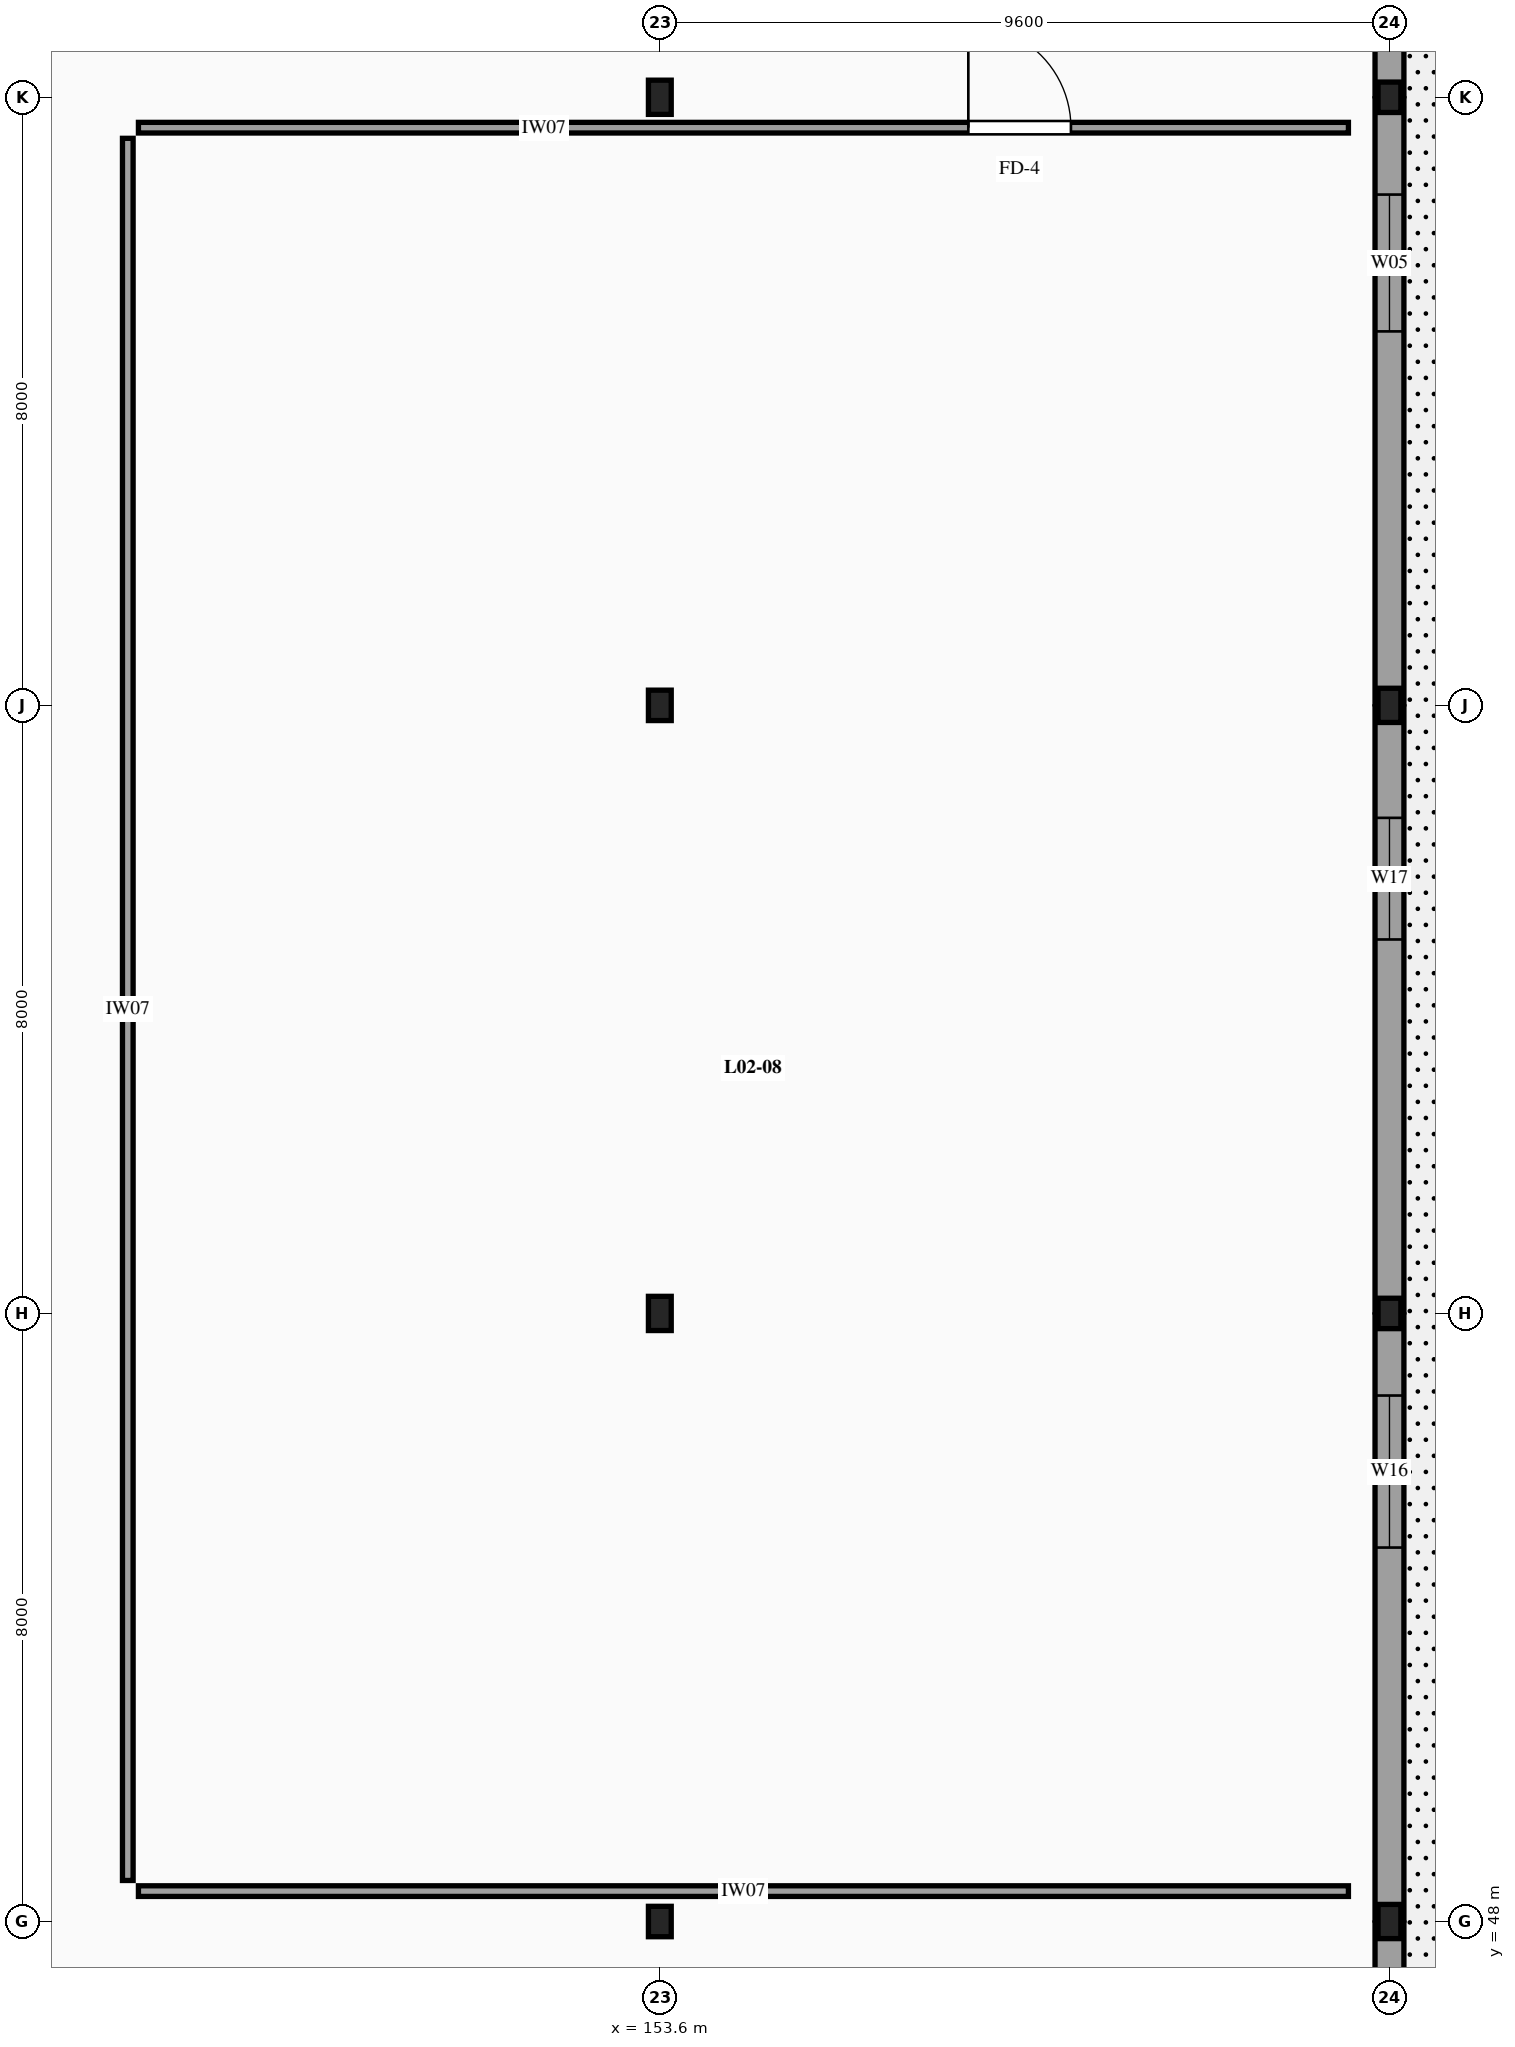
"""IFC4 building model, lengths in metres.
Left out: names, types, materials, properties, quantities, classifications, styles, units other than length and angle.
Written with IfcOpenShell. Run it as: python <this file> out.ifc"""

import sys

from ifc_helpers import new_model, si_unit, direction, frame, frame_2d, origin, origin_2d, place, context, subcontext, project, spatial, rectangle, i_section, extrude, element, fill, save


model = new_model("IFC4")
c1 = context("Model", 3, precision=1e-05, world=origin(), true_north=direction((0.0, 1.0)))
c2 = subcontext(c1, "Body", "Model", "MODEL_VIEW")
j1 = project(units=[si_unit("LENGTHUNIT", "METRE"), si_unit("PLANEANGLEUNIT", "RADIAN")], contexts=[c1])
p1 = place(None, origin())
s1 = spatial("IfcSite", under=j1, at=p1, CompositionType="ELEMENT")
p2 = place(p1, origin())
s2 = spatial("IfcBuilding", under=s1, at=p2, CompositionType="ELEMENT")
p3 = place(p2, frame((0.0, 0.0, 8.7)))
s3 = spatial("IfcBuildingStorey", under=s2, at=p3, CompositionType="ELEMENT", Elevation=8.7)
p4 = place(p3, frame((153.6, 48.0, -0.26), z_axis=(0.0, 0.0, 1.0), x_axis=(1.0, 0.0, 0.0)))
e1 = element("IfcColumn", 1, at=p4, inside=s3, PredefinedType="COLUMN", context=c2, shape_type="SweptSolid", body=[
    extrude(i_section(OverallWidth=0.3, OverallDepth=0.4, WebThickness=0.013, FlangeThickness=0.024, FilletRadius=0.027, at=origin_2d()), origin(), (0.0, 0.0, 1.0), 4.2),
])
p5 = place(p3, frame((153.6, 56.0, -0.26), z_axis=(0.0, 0.0, 1.0), x_axis=(1.0, 0.0, 0.0)))
e2 = element("IfcColumn", 2, at=p5, inside=s3, PredefinedType="COLUMN", context=c2, shape_type="SweptSolid", body=[
    extrude(i_section(OverallWidth=0.3, OverallDepth=0.45, WebThickness=0.014, FlangeThickness=0.026, FilletRadius=0.027, at=origin_2d()), origin(), (0.0, 0.0, 1.0), 4.2),
])
p6 = place(p3, frame((153.6, 64.0, -0.26), z_axis=(0.0, 0.0, 1.0), x_axis=(1.0, 0.0, 0.0)))
e3 = element("IfcColumn", 3, at=p6, inside=s3, PredefinedType="COLUMN", context=c2, shape_type="SweptSolid", body=[
    extrude(i_section(OverallWidth=0.3, OverallDepth=0.4, WebThickness=0.013, FlangeThickness=0.024, FilletRadius=0.027, at=origin_2d()), origin(), (0.0, 0.0, 1.0), 4.2),
])
for number, where, z_axis, x_axis in (
    (4, (153.6, 72.0, -0.26), (0.0, 0.0, 1.0), (1.0, 0.0, 0.0)),
    (5, (163.2, 48.0, -0.26), (0.0, 0.0, 1.0), (1.0, 0.0, 0.0)),
):
    element("IfcColumn", number, at=place(p3, frame(where, z_axis=z_axis, x_axis=x_axis)), inside=s3, PredefinedType="COLUMN", context=c2, shape_type="SweptSolid", body=[
        extrude(i_section(OverallWidth=0.3, OverallDepth=0.45, WebThickness=0.014, FlangeThickness=0.026, FilletRadius=0.027, at=origin_2d()), origin(), (0.0, 0.0, 1.0), 4.2),
    ])
p7 = place(p3, frame((163.2, 56.0, -0.26), z_axis=(0.0, 0.0, 1.0), x_axis=(1.0, 0.0, 0.0)))
e6 = element("IfcColumn", 6, at=p7, inside=s3, PredefinedType="COLUMN", context=c2, shape_type="SweptSolid", body=[
    extrude(i_section(OverallWidth=0.3, OverallDepth=0.4, WebThickness=0.013, FlangeThickness=0.024, FilletRadius=0.027, at=origin_2d()), origin(), (0.0, 0.0, 1.0), 4.2),
])
p8 = place(p3, frame((163.2, 64.0, -0.26), z_axis=(0.0, 0.0, 1.0), x_axis=(1.0, 0.0, 0.0)))
e7 = element("IfcColumn", 7, at=p8, inside=s3, PredefinedType="COLUMN", context=c2, shape_type="SweptSolid", body=[
    extrude(i_section(OverallWidth=0.3, OverallDepth=0.45, WebThickness=0.014, FlangeThickness=0.026, FilletRadius=0.027, at=origin_2d()), origin(), (0.0, 0.0, 1.0), 4.2),
])
p9 = place(p3, frame((163.2, 72.0, -0.26), z_axis=(0.0, 0.0, 1.0), x_axis=(1.0, 0.0, 0.0)))
e8 = element("IfcColumn", 8, at=p9, inside=s3, PredefinedType="COLUMN", context=c2, shape_type="SweptSolid", body=[
    extrude(i_section(OverallWidth=0.3, OverallDepth=0.4, WebThickness=0.013, FlangeThickness=0.024, FilletRadius=0.027, at=origin_2d()), origin(), (0.0, 0.0, 1.0), 4.2),
])
p10 = place(p3, frame((163.2, 40.02, 0.0), z_axis=(0.0, 0.0, 1.0), x_axis=(0.0, 1.0, 0.0)))
e9 = element("IfcWall", 9, at=p10, inside=s3, PredefinedType="SOLIDWALL", context=c2, shape_type="SweptSolid", body=[
    extrude(rectangle(XDim=7.96, YDim=0.38, at=frame_2d((3.98, 0.0))), origin(), (0.0, 0.0, 1.0), 3.36),
])
p11 = place(p10, frame((4.9, 0.0, 0.72)))
e10 = element("IfcOpeningElement", 10, at=p11, cuts=e9, PredefinedType="OPENING", context=c2, shape_type="SweptSolid", body=[
    extrude(rectangle(XDim=1.8, YDim=1.6, at=frame_2d((0.9, 0.8))), frame((0.0, 0.2, 0.0), z_axis=(0.0, -1.0, 0.0), x_axis=(1.0, 0.0, 0.0)), (0.0, 0.0, 1.0), 0.4),
])
p12 = place(p3, frame((163.2, 48.02, 0.0), z_axis=(0.0, 0.0, 1.0), x_axis=(0.0, 1.0, 0.0)))
e11 = element("IfcWall", 11, at=p12, inside=s3, PredefinedType="SOLIDWALL", context=c2, shape_type="SweptSolid", body=[
    extrude(rectangle(XDim=7.96, YDim=0.38, at=frame_2d((3.98, 0.0))), origin(), (0.0, 0.0, 1.0), 3.36),
])
p13 = place(p12, frame((4.9, 0.0, 0.9)))
e12 = element("IfcOpeningElement", 12, at=p13, cuts=e11, PredefinedType="OPENING", context=c2, shape_type="SweptSolid", body=[
    extrude(rectangle(XDim=2.0, YDim=2.2, at=frame_2d((1.0, 1.1))), frame((0.0, 0.2, 0.0), z_axis=(0.0, -1.0, 0.0), x_axis=(1.0, 0.0, 0.0)), (0.0, 0.0, 1.0), 0.4),
])
p14 = place(p3, frame((163.2, 56.02, 0.0), z_axis=(0.0, 0.0, 1.0), x_axis=(0.0, 1.0, 0.0)))
e13 = element("IfcWall", 13, at=p14, inside=s3, PredefinedType="SOLIDWALL", context=c2, shape_type="SweptSolid", body=[
    extrude(rectangle(XDim=7.96, YDim=0.38, at=frame_2d((3.98, 0.0))), origin(), (0.0, 0.0, 1.0), 3.36),
])
p15 = place(p14, frame((4.9, 0.0, 0.9)))
e14 = element("IfcOpeningElement", 14, at=p15, cuts=e13, PredefinedType="OPENING", context=c2, shape_type="SweptSolid", body=[
    extrude(rectangle(XDim=1.6, YDim=2.0, at=frame_2d((0.8, 1.0))), frame((0.0, 0.2, 0.0), z_axis=(0.0, -1.0, 0.0), x_axis=(1.0, 0.0, 0.0)), (0.0, 0.0, 1.0), 0.4),
])
p16 = place(p3, frame((163.2, 64.02, 0.0), z_axis=(0.0, 0.0, 1.0), x_axis=(0.0, 1.0, 0.0)))
e15 = element("IfcWall", 15, at=p16, inside=s3, PredefinedType="SOLIDWALL", context=c2, shape_type="SweptSolid", body=[
    extrude(rectangle(XDim=7.96, YDim=0.38, at=frame_2d((3.98, 0.0))), origin(), (0.0, 0.0, 1.0), 3.36),
])
p17 = place(p16, frame((4.9, 0.0, 0.72)))
e16 = element("IfcOpeningElement", 16, at=p17, cuts=e15, PredefinedType="OPENING", context=c2, shape_type="SweptSolid", body=[
    extrude(rectangle(XDim=1.8, YDim=2.4, at=frame_2d((0.9, 1.2))), frame((0.0, 0.2, 0.0), z_axis=(0.0, -1.0, 0.0), x_axis=(1.0, 0.0, 0.0)), (0.0, 0.0, 1.0), 0.4),
])
p18 = place(p3, frame((163.2, 72.02, 0.0), z_axis=(0.0, 0.0, 1.0), x_axis=(0.0, 1.0, 0.0)))
e17 = element("IfcWall", 17, at=p18, inside=s3, PredefinedType="SOLIDWALL", context=c2, shape_type="SweptSolid", body=[
    extrude(rectangle(XDim=7.96, YDim=0.38, at=frame_2d((3.98, 0.0))), origin(), (0.0, 0.0, 1.0), 3.36),
])
p19 = place(p18, frame((2.8, 0.0, 0.0)))
e18 = element("IfcOpeningElement", 18, at=p19, cuts=e17, PredefinedType="OPENING", context=c2, shape_type="SweptSolid", body=[
    extrude(rectangle(XDim=1.35, YDim=2.2, at=frame_2d((0.675, 1.1))), frame((0.0, 0.2, 0.0), z_axis=(0.0, -1.0, 0.0), x_axis=(1.0, 0.0, 0.0)), (0.0, 0.0, 1.0), 0.4),
])
p20 = place(p3, frame((146.74, 71.6, 0.0), z_axis=(0.0, 0.0, 1.0), x_axis=(1.0, 0.0, 0.0)))
e19 = element("IfcWall", 19, at=p20, inside=s3, PredefinedType="PARTITIONING", context=c2, shape_type="SweptSolid", body=[
    extrude(rectangle(XDim=15.92, YDim=0.14, at=frame_2d((7.96, 0.0))), origin(), (0.0, 0.0, 1.0), 3.1),
])
p21 = place(p20, frame((10.919, 0.0, 0.0)))
e20 = element("IfcOpeningElement", 20, at=p21, cuts=e19, PredefinedType="OPENING", context=c2, shape_type="SweptSolid", body=[
    extrude(rectangle(XDim=1.35, YDim=2.2, at=frame_2d((0.675, 1.1))), frame((0.0, 0.08, 0.0), z_axis=(0.0, -1.0, 0.0), x_axis=(1.0, 0.0, 0.0)), (0.0, 0.0, 1.0), 0.16),
])
p22 = place(p3, frame((146.74, 48.4, 0.0), z_axis=(0.0, 0.0, 1.0), x_axis=(1.0, 0.0, 0.0)))
e21 = element("IfcWall", 21, at=p22, inside=s3, PredefinedType="PARTITIONING", context=c2, shape_type="SweptSolid", body=[
    extrude(rectangle(XDim=15.92, YDim=0.14, at=frame_2d((7.96, 0.0))), origin(), (0.0, 0.0, 1.0), 3.1),
])
p23 = place(p3, frame((146.6, 48.54, 0.0), z_axis=(0.0, 0.0, 1.0), x_axis=(0.0, 1.0, 0.0)))
e22 = element("IfcWall", 22, at=p23, inside=s3, PredefinedType="PARTITIONING", context=c2, shape_type="SweptSolid", body=[
    extrude(rectangle(XDim=22.92, YDim=0.14, at=frame_2d((11.46, 0.0))), origin(), (0.0, 0.0, 1.0), 3.1),
])
p24 = place(p13, origin())
e23 = element("IfcWindow", 23, at=p24, inside=s3, PartitioningType="SINGLE_PANEL", PredefinedType="WINDOW", context=c2, shape_type="SweptSolid", body=[
    extrude(rectangle(XDim=2.0, YDim=2.2, at=frame_2d((1.0, 1.1))), frame((0.0, 0.03, 0.0), z_axis=(0.0, -1.0, 0.0), x_axis=(1.0, 0.0, 0.0)), (0.0, 0.0, 1.0), 0.06),
])
fill(e12, e23)
p25 = place(p15, origin())
e24 = element("IfcWindow", 24, at=p25, inside=s3, PartitioningType="SINGLE_PANEL", PredefinedType="WINDOW", context=c2, shape_type="SweptSolid", body=[
    extrude(rectangle(XDim=1.6, YDim=2.0, at=frame_2d((0.8, 1.0))), frame((0.0, 0.03, 0.0), z_axis=(0.0, -1.0, 0.0), x_axis=(1.0, 0.0, 0.0)), (0.0, 0.0, 1.0), 0.06),
])
fill(e14, e24)
p26 = place(p17, origin())
e25 = element("IfcWindow", 25, at=p26, inside=s3, PartitioningType="SINGLE_PANEL", PredefinedType="WINDOW", context=c2, shape_type="SweptSolid", body=[
    extrude(rectangle(XDim=1.8, YDim=2.4, at=frame_2d((0.9, 1.2))), frame((0.0, 0.03, 0.0), z_axis=(0.0, -1.0, 0.0), x_axis=(1.0, 0.0, 0.0)), (0.0, 0.0, 1.0), 0.06),
])
fill(e16, e25)
p27 = place(p21, origin())
e26 = element("IfcDoor", 26, at=p27, inside=s3, OperationType="SINGLE_SWING_LEFT", PredefinedType="DOOR", context=c2, shape_type="SweptSolid", body=[
    extrude(rectangle(XDim=1.35, YDim=2.2, at=frame_2d((0.675, 1.1))), frame((0.0, 0.025, 0.0), z_axis=(0.0, -1.0, 0.0), x_axis=(1.0, 0.0, 0.0)), (0.0, 0.0, 1.0), 0.05),
])
fill(e20, e26)
save(model, sys.argv[1])
